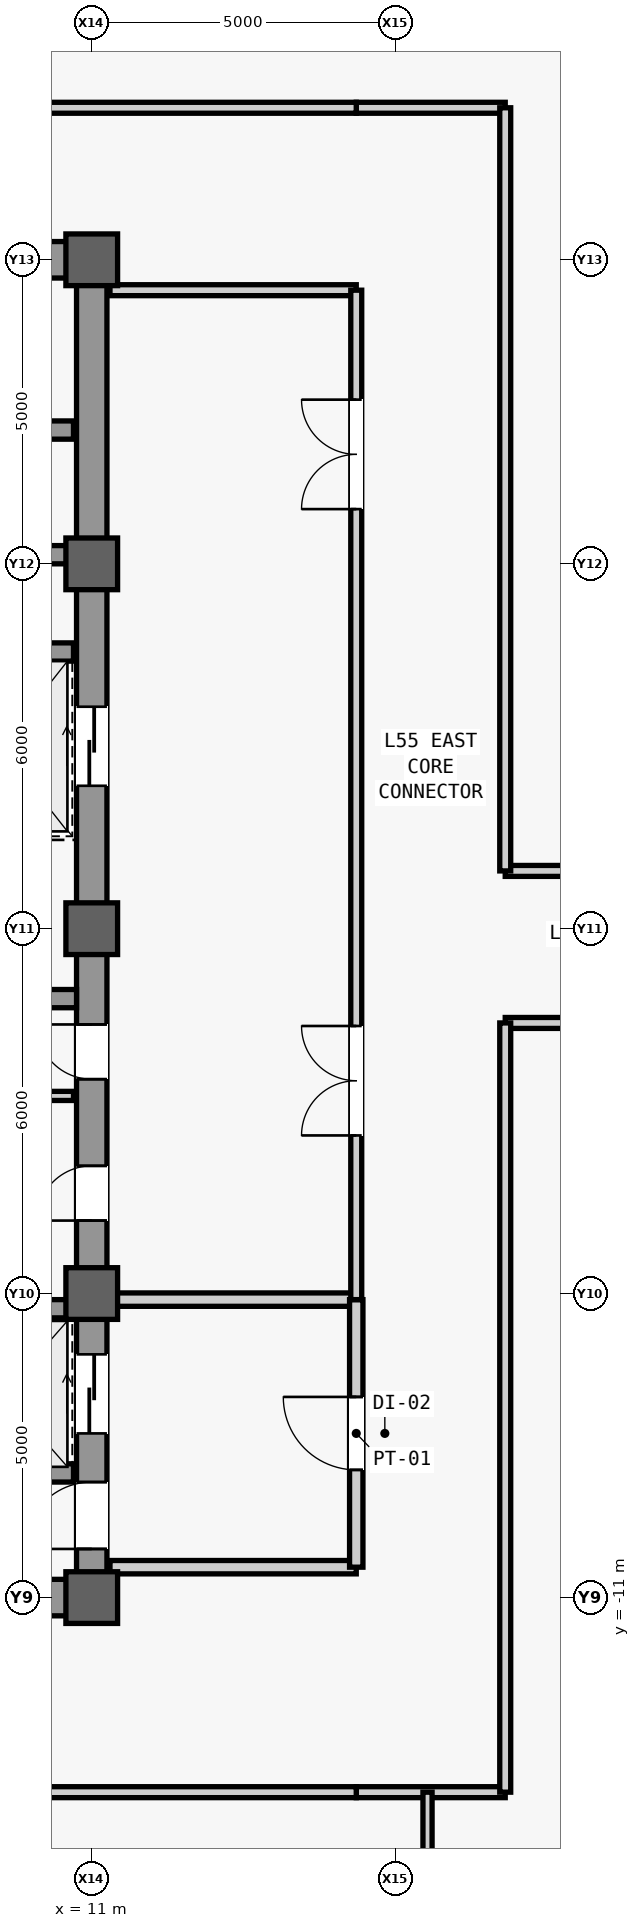
"""IFC4 building model, lengths in metres.
Left out: names, types, materials, properties, quantities, classifications, styles, units other than length and angle.
Written with IfcOpenShell. Run it as: python <this file> out.ifc"""

import sys

from ifc_helpers import new_model, si_unit, direction, frame, frame_2d, origin, origin_2d, place, context, subcontext, project, spatial, rectangle, extrude, source, transform, mapped, element, fill, save


model = new_model("IFC4")
c1 = context("Model", 3, precision=1e-05, world=origin(), true_north=direction((0.0, 1.0)))
c2 = subcontext(c1, "Body", "Model", "MODEL_VIEW")
j1 = project(units=[si_unit("LENGTHUNIT", "METRE"), si_unit("PLANEANGLEUNIT", "RADIAN")], contexts=[c1])
p1 = place(None, origin())
s1 = spatial("IfcSite", under=j1, at=p1, CompositionType="ELEMENT")
p2 = place(p1, origin())
s2 = spatial("IfcBuilding", under=s1, at=p2, CompositionType="ELEMENT")
p3 = place(p2, frame((0.0, 0.0, 235.1)))
s3 = spatial("IfcBuildingStorey", under=s2, at=p3, CompositionType="ELEMENT", Elevation=235.1)
m1 = source(origin(), c2, "Body", "SweptSolid", [
    extrude(rectangle(XDim=22.0, YDim=0.5, at=frame_2d((11.0, 0.0))), origin(), (0.0, 0.0, 1.0), 3.78),
])
p4 = place(p3, frame((11.0, -11.0, 0.0), z_axis=(0.0, 0.0, 1.0), x_axis=(0.0, 1.0, 0.0)))
e1 = element("IfcWall", 1, at=p4, inside=s3, PredefinedType="SHEAR", context=c2, shape_type="MappedRepresentation", body=[
    mapped(m1, transform((0.0, 0.0, 0.0), scale=1.0)),
])
m2 = source(origin(), c2, "Body", "SweptSolid", [
    extrude(rectangle(XDim=1.1, YDim=2.2, at=frame_2d((0.55, 1.1))), frame((0.0, 0.26, 0.0), z_axis=(0.0, -1.0, 0.0), x_axis=(1.0, 0.0, 0.0)), (0.0, 0.0, 1.0), 0.52),
])
p5 = place(p4, frame((0.8, 0.0, 0.0)))
e2 = element("IfcOpeningElement", 2, at=p5, cuts=e1, PredefinedType="OPENING", context=c2, shape_type="MappedRepresentation", body=[
    mapped(m2, transform((0.0, 0.0, 0.0), scale=1.0)),
])
m3 = source(origin(), c2, "Body", "SweptSolid", [
    extrude(rectangle(XDim=0.9, YDim=2.15, at=frame_2d((0.45, 1.075))), frame((0.0, 0.26, 0.0), z_axis=(0.0, -1.0, 0.0), x_axis=(1.0, 0.0, 0.0)), (0.0, 0.0, 1.0), 0.52),
])
p6 = place(p4, frame((6.2, 0.0, 0.0)))
e3 = element("IfcOpeningElement", 3, at=p6, cuts=e1, PredefinedType="OPENING", context=c2, shape_type="MappedRepresentation", body=[
    mapped(m3, transform((0.0, 0.0, 0.0), scale=1.0)),
])
p7 = place(p4, frame((8.525, 0.0, 0.0)))
e4 = element("IfcOpeningElement", 4, at=p7, cuts=e1, PredefinedType="OPENING", context=c2, shape_type="MappedRepresentation", body=[
    mapped(m3, transform((0.0, 0.0, 0.0), scale=1.0)),
])
m4 = source(origin(), c2, "Body", "SweptSolid", [
    extrude(rectangle(XDim=1.3, YDim=2.3, at=frame_2d((0.65, 1.15))), frame((0.0, 0.26, 0.0), z_axis=(0.0, -1.0, 0.0), x_axis=(1.0, 0.0, 0.0)), (0.0, 0.0, 1.0), 0.52),
])
p8 = place(p4, frame((2.7, 0.0, 0.0)))
e5 = element("IfcOpeningElement", 5, at=p8, cuts=e1, PredefinedType="OPENING", context=c2, shape_type="MappedRepresentation", body=[
    mapped(m4, transform((0.0, 0.0, 0.0), scale=1.0)),
])
p9 = place(p4, frame((13.35, 0.0, 0.0)))
e6 = element("IfcOpeningElement", 6, at=p9, cuts=e1, PredefinedType="OPENING", context=c2, shape_type="MappedRepresentation", body=[
    mapped(m4, transform((0.0, 0.0, 0.0), scale=1.0)),
])
m5 = source(origin(), c2, "Body", "SweptSolid", [
    extrude(rectangle(XDim=5.9, YDim=0.6, at=frame_2d((2.95, 0.0))), origin(), (0.0, 0.0, 1.0), 3.78),
])
p10 = place(p3, frame((4.85, -11.0, 0.0), z_axis=(0.0, 0.0, 1.0), x_axis=(1.0, 0.0, 0.0)))
e7 = element("IfcWall", 7, at=p10, inside=s3, PredefinedType="SHEAR", context=c2, shape_type="MappedRepresentation", body=[
    mapped(m5, transform((0.0, 0.0, 0.0), scale=1.0)),
])
p11 = place(p3, frame((4.85, 11.0, 0.0), z_axis=(0.0, 0.0, 1.0), x_axis=(1.0, 0.0, 0.0)))
e8 = element("IfcWall", 8, at=p11, inside=s3, PredefinedType="SHEAR", context=c2, shape_type="MappedRepresentation", body=[
    mapped(m5, transform((0.0, 0.0, 0.0), scale=1.0)),
])
m6 = source(origin(), c2, "Body", "SweptSolid", [
    extrude(rectangle(XDim=1.05, YDim=2.2, at=frame_2d((0.525, 1.1))), frame((0.0, 0.31, 0.0), z_axis=(0.0, -1.0, 0.0), x_axis=(1.0, 0.0, 0.0)), (0.0, 0.0, 1.0), 0.62),
])
p12 = place(p11, frame((1.375, 0.0, 0.0)))
e9 = element("IfcOpeningElement", 9, at=p12, cuts=e8, PredefinedType="OPENING", context=c2, shape_type="MappedRepresentation", body=[
    mapped(m6, transform((0.0, 0.0, 0.0), scale=1.0)),
])
m7 = source(origin(), c2, "Body", "SweptSolid", [
    extrude(rectangle(XDim=5.65, YDim=0.3, at=frame_2d((2.825, 0.0))), origin(), (0.0, 0.0, 1.0), 3.78),
])
p13 = place(p3, frame((5.1, -1.15, 0.0), z_axis=(0.0, 0.0, 1.0), x_axis=(1.0, 0.0, 0.0)))
e10 = element("IfcWall", 10, at=p13, inside=s3, PredefinedType="SHEAR", context=c2, shape_type="MappedRepresentation", body=[
    mapped(m7, transform((0.0, 0.0, 0.0), scale=1.0)),
])
m8 = source(origin(), c2, "Body", "SweptSolid", [
    extrude(rectangle(XDim=0.85, YDim=0.85, at=origin_2d()), origin(), (0.0, 0.0, 1.0), 4.0),
])
for number, where, z_axis, x_axis in (
    (11, (11.0, -11.0, 0.0), (0.0, 0.0, 1.0), (1.0, 0.0, 0.0)),
    (12, (11.0, -6.0, 0.0), (0.0, 0.0, 1.0), (1.0, 0.0, 0.0)),
    (13, (11.0, 0.0, 0.0), (0.0, 0.0, 1.0), (1.0, 0.0, 0.0)),
    (14, (11.0, 6.0, 0.0), (0.0, 0.0, 1.0), (1.0, 0.0, 0.0)),
    (15, (11.0, 11.0, 0.0), (0.0, 0.0, 1.0), (1.0, 0.0, 0.0)),
):
    element("IfcColumn", number, at=place(p3, frame(where, z_axis=z_axis, x_axis=x_axis)), inside=s3, PredefinedType="COLUMN", context=c2, shape_type="MappedRepresentation", body=[
        mapped(m8, transform((0.0, 0.0, 0.0), scale=1.0)),
    ])
m9 = source(origin(), c2, "Body", "SweptSolid", [
    extrude(rectangle(XDim=2.2, YDim=0.3, at=frame_2d((1.1, 0.0))), origin(), (0.0, 0.0, 1.0), 3.78),
])
for number, where, z_axis, x_axis in (
    (16, (8.5, -8.95, 0.0), (0.0, 0.0, 1.0), (1.0, 0.0, 0.0)),
    (17, (8.5, -6.25, 0.0), (0.0, 0.0, 1.0), (1.0, 0.0, 0.0)),
):
    element("IfcWall", number, at=place(p3, frame(where, z_axis=z_axis, x_axis=x_axis)), inside=s3, PredefinedType="SHEAR", context=c2, shape_type="MappedRepresentation", body=[
        mapped(m9, transform((0.0, 0.0, 0.0), scale=1.0)),
    ])
m10 = source(origin(), c2, "Body", "SweptSolid", [
    extrude(rectangle(XDim=2.3, YDim=0.3, at=frame_2d((1.15, 0.0))), origin(), (0.0, 0.0, 1.0), 3.78),
])
for number, where, z_axis, x_axis in (
    (18, (8.4, 4.55, 0.0), (0.0, 0.0, 1.0), (1.0, 0.0, 0.0)),
    (19, (8.4, 6.15, 0.0), (0.0, 0.0, 1.0), (1.0, 0.0, 0.0)),
    (20, (8.4, 8.2, 0.0), (0.0, 0.0, 1.0), (1.0, 0.0, 0.0)),
):
    element("IfcWall", number, at=place(p3, frame(where, z_axis=z_axis, x_axis=x_axis)), inside=s3, PredefinedType="SHEAR", context=c2, shape_type="MappedRepresentation", body=[
        mapped(m10, transform((0.0, 0.0, 0.0), scale=1.0)),
    ])
m11 = source(origin(), c2, "Body", "SweptSolid", [
    extrude(rectangle(XDim=2.05, YDim=0.15, at=frame_2d((1.025, 0.0))), origin(), (0.0, 0.0, 1.0), 3.78),
])
p14 = place(p3, frame((8.65, -2.75, 0.0), z_axis=(0.0, 0.0, 1.0), x_axis=(1.0, 0.0, 0.0)))
e21 = element("IfcWall", 21, at=p14, inside=s3, PredefinedType="PARTITIONING", context=c2, shape_type="MappedRepresentation", body=[
    mapped(m11, transform((0.0, 0.0, 0.0), scale=1.0)),
])
m12 = source(origin(), c2, "Body", "SweptSolid", [
    extrude(rectangle(XDim=4.05, YDim=0.22, at=frame_2d((2.025, 0.0))), origin(), (0.0, 0.0, 1.0), 3.78),
])
p15 = place(p3, frame((11.3, -10.5, 0.0), z_axis=(0.0, 0.0, 1.0), x_axis=(1.0, 0.0, 0.0)))
e22 = element("IfcWall", 22, at=p15, inside=s3, PredefinedType="PARTITIONING", context=c2, shape_type="MappedRepresentation", body=[
    mapped(m12, transform((0.0, 0.0, 0.0), scale=1.0)),
])
m13 = source(origin(), c2, "Body", "SweptSolid", [
    extrude(rectangle(XDim=4.05, YDim=0.22, at=frame_2d((2.025, 0.0))), origin(), (0.0, 0.0, 1.0), 3.085),
])
p16 = place(p3, frame((11.3, -6.1, 0.0), z_axis=(0.0, 0.0, 1.0), x_axis=(1.0, 0.0, 0.0)))
e23 = element("IfcWall", 23, at=p16, inside=s3, PredefinedType="PARTITIONING", context=c2, shape_type="MappedRepresentation", body=[
    mapped(m13, transform((0.0, 0.0, 0.0), scale=1.0)),
])
m14 = source(origin(), c2, "Body", "SweptSolid", [
    extrude(rectangle(XDim=4.4, YDim=0.22, at=frame_2d((2.2, 0.0))), origin(), (0.0, 0.0, 1.0), 3.78),
])
p17 = place(p3, frame((15.35, -10.5, 0.0), z_axis=(0.0, 0.0, 1.0), x_axis=(0.0, 1.0, 0.0)))
e24 = element("IfcWall", 24, at=p17, inside=s3, PredefinedType="PARTITIONING", context=c2, shape_type="MappedRepresentation", body=[
    mapped(m14, transform((0.0, 0.0, 0.0), scale=1.0)),
])
m15 = source(origin(), c2, "Body", "SweptSolid", [
    extrude(rectangle(XDim=1.2, YDim=2.2, at=frame_2d((0.6, 1.1))), frame((0.0, 0.12, 0.0), z_axis=(0.0, -1.0, 0.0), x_axis=(1.0, 0.0, 0.0)), (0.0, 0.0, 1.0), 0.24),
])
p18 = place(p17, frame((1.6, 0.0, 0.0)))
e25 = element("IfcOpeningElement", 25, at=p18, cuts=e24, PredefinedType="OPENING", context=c2, shape_type="MappedRepresentation", body=[
    mapped(m15, transform((0.0, 0.0, 0.0), scale=1.0)),
])
m16 = source(origin(), c2, "Body", "SweptSolid", [
    extrude(rectangle(XDim=4.05, YDim=0.18, at=frame_2d((2.025, 0.0))), origin(), (0.0, 0.0, 1.0), 3.78),
])
p19 = place(p3, frame((11.3, 10.5, 0.0), z_axis=(0.0, 0.0, 1.0), x_axis=(1.0, 0.0, 0.0)))
e26 = element("IfcWall", 26, at=p19, inside=s3, PredefinedType="PARTITIONING", context=c2, shape_type="MappedRepresentation", body=[
    mapped(m16, transform((0.0, 0.0, 0.0), scale=1.0)),
])
m17 = source(origin(), c2, "Body", "SweptSolid", [
    extrude(rectangle(XDim=16.6, YDim=0.18, at=frame_2d((8.3, 0.0))), origin(), (0.0, 0.0, 1.0), 3.78),
])
p20 = place(p3, frame((15.35, -6.1, 0.0), z_axis=(0.0, 0.0, 1.0), x_axis=(0.0, 1.0, 0.0)))
e27 = element("IfcWall", 27, at=p20, inside=s3, PredefinedType="PARTITIONING", context=c2, shape_type="MappedRepresentation", body=[
    mapped(m17, transform((0.0, 0.0, 0.0), scale=1.0)),
])
m18 = source(origin(), c2, "Body", "SweptSolid", [
    extrude(rectangle(XDim=1.8, YDim=2.25, at=frame_2d((0.9, 1.125))), frame((0.0, 0.1, 0.0), z_axis=(0.0, -1.0, 0.0), x_axis=(1.0, 0.0, 0.0)), (0.0, 0.0, 1.0), 0.2),
])
p21 = place(p20, frame((2.7, 0.0, 0.0)))
e28 = element("IfcOpeningElement", 28, at=p21, cuts=e27, PredefinedType="OPENING", context=c2, shape_type="MappedRepresentation", body=[
    mapped(m18, transform((0.0, 0.0, 0.0), scale=1.0)),
])
p22 = place(p20, frame((13.0, 0.0, 0.0)))
e29 = element("IfcOpeningElement", 29, at=p22, cuts=e27, PredefinedType="OPENING", context=c2, shape_type="MappedRepresentation", body=[
    mapped(m18, transform((0.0, 0.0, 0.0), scale=1.0)),
])
m19 = source(origin(), c2, "Body", "SweptSolid", [
    extrude(rectangle(XDim=2.45, YDim=0.18, at=frame_2d((1.225, 0.0))), origin(), (0.0, 0.0, 1.0), 3.78),
])
for number, where, z_axis, x_axis in (
    (30, (15.35, -14.2, 0.0), (0.0, 0.0, 1.0), (1.0, 0.0, 0.0)),
    (31, (15.35, 13.5, 0.0), (0.0, 0.0, 1.0), (1.0, 0.0, 0.0)),
):
    element("IfcWall", number, at=place(p3, frame(where, z_axis=z_axis, x_axis=x_axis)), inside=s3, PredefinedType="PARTITIONING", context=c2, shape_type="MappedRepresentation", body=[
        mapped(m19, transform((0.0, 0.0, 0.0), scale=1.0)),
    ])
m20 = source(origin(), c2, "Body", "SweptSolid", [
    extrude(rectangle(XDim=15.8, YDim=0.15, at=frame_2d((7.9, 0.0))), origin(), (0.0, 0.0, 1.0), 3.78),
])
p23 = place(p3, frame((16.522, -30.0, 0.0), z_axis=(0.0, 0.0, 1.0), x_axis=(0.0, 1.0, 0.0)))
e32 = element("IfcWall", 32, at=p23, inside=s3, PredefinedType="PARTITIONING", context=c2, shape_type="MappedRepresentation", body=[
    mapped(m20, transform((0.0, 0.0, 0.0), scale=1.0)),
])
m21 = source(origin(), c2, "Body", "SweptSolid", [
    extrude(rectangle(XDim=0.95, YDim=2.15, at=frame_2d((0.475, 1.075))), frame((0.0, 0.085, 0.0), z_axis=(0.0, -1.0, 0.0), x_axis=(1.0, 0.0, 0.0)), (0.0, 0.0, 1.0), 0.17),
])
p24 = place(p23, frame((11.375, 0.0, 0.0)))
e33 = element("IfcOpeningElement", 33, at=p24, cuts=e32, PredefinedType="OPENING", context=c2, shape_type="MappedRepresentation", body=[
    mapped(m21, transform((0.0, 0.0, 0.0), scale=1.0)),
])
m22 = source(origin(), c2, "Body", "SweptSolid", [
    extrude(rectangle(XDim=6.05, YDim=0.18, at=frame_2d((3.025, 0.0))), origin(), (0.0, 0.0, 1.0), 3.78),
])
p25 = place(p3, frame((9.3, -14.2, 0.0), z_axis=(0.0, 0.0, 1.0), x_axis=(1.0, 0.0, 0.0)))
e34 = element("IfcWall", 34, at=p25, inside=s3, PredefinedType="PARTITIONING", context=c2, shape_type="MappedRepresentation", body=[
    mapped(m22, transform((0.0, 0.0, 0.0), scale=1.0)),
])
m23 = source(origin(), c2, "Body", "SweptSolid", [
    extrude(rectangle(XDim=18.65, YDim=0.18, at=frame_2d((9.325, 0.0))), origin(), (0.0, 0.0, 1.0), 3.78),
])
p26 = place(p3, frame((-3.3, 13.5, 0.0), z_axis=(0.0, 0.0, 1.0), x_axis=(1.0, 0.0, 0.0)))
e35 = element("IfcWall", 35, at=p26, inside=s3, PredefinedType="PARTITIONING", context=c2, shape_type="MappedRepresentation", body=[
    mapped(m23, transform((0.0, 0.0, 0.0), scale=1.0)),
])
m24 = source(origin(), c2, "Body", "SweptSolid", [
    extrude(rectangle(XDim=12.2, YDim=0.18, at=frame_2d((6.1, 0.0))), origin(), (0.0, 0.0, 1.0), 3.78),
])
p27 = place(p3, frame((17.8, -1.55, 0.0), z_axis=(0.0, 0.0, 1.0), x_axis=(1.0, 0.0, 0.0)))
e36 = element("IfcWall", 36, at=p27, inside=s3, PredefinedType="PARTITIONING", context=c2, shape_type="MappedRepresentation", body=[
    mapped(m24, transform((0.0, 0.0, 0.0), scale=1.0)),
])
m25 = source(origin(), c2, "Body", "SweptSolid", [
    extrude(rectangle(XDim=0.95, YDim=2.15, at=frame_2d((0.475, 1.075))), frame((0.0, 0.1, 0.0), z_axis=(0.0, -1.0, 0.0), x_axis=(1.0, 0.0, 0.0)), (0.0, 0.0, 1.0), 0.2),
])
p28 = place(p27, frame((5.625, 0.0, 0.0)))
e37 = element("IfcOpeningElement", 37, at=p28, cuts=e36, PredefinedType="OPENING", context=c2, shape_type="MappedRepresentation", body=[
    mapped(m25, transform((0.0, 0.0, 0.0), scale=1.0)),
])
m26 = source(origin(), c2, "Body", "SweptSolid", [
    extrude(rectangle(XDim=12.65, YDim=0.18, at=frame_2d((6.325, 0.0))), origin(), (0.0, 0.0, 1.0), 3.78),
])
p29 = place(p3, frame((17.8, -14.2, 0.0), z_axis=(0.0, 0.0, 1.0), x_axis=(0.0, 1.0, 0.0)))
e38 = element("IfcWall", 38, at=p29, inside=s3, PredefinedType="PARTITIONING", context=c2, shape_type="MappedRepresentation", body=[
    mapped(m26, transform((0.0, 0.0, 0.0), scale=1.0)),
])
p30 = place(p3, frame((17.8, 0.95, 0.0), z_axis=(0.0, 0.0, 1.0), x_axis=(1.0, 0.0, 0.0)))
e39 = element("IfcWall", 39, at=p30, inside=s3, PredefinedType="PARTITIONING", context=c2, shape_type="MappedRepresentation", body=[
    mapped(m24, transform((0.0, 0.0, 0.0), scale=1.0)),
])
p31 = place(p30, frame((5.625, 0.0, 0.0)))
e40 = element("IfcOpeningElement", 40, at=p31, cuts=e39, PredefinedType="OPENING", context=c2, shape_type="MappedRepresentation", body=[
    mapped(m25, transform((0.0, 0.0, 0.0), scale=1.0)),
])
m27 = source(origin(), c2, "Body", "SweptSolid", [
    extrude(rectangle(XDim=12.55, YDim=0.18, at=frame_2d((6.275, 0.0))), origin(), (0.0, 0.0, 1.0), 3.78),
])
p32 = place(p3, frame((17.8, 0.95, 0.0), z_axis=(0.0, 0.0, 1.0), x_axis=(0.0, 1.0, 0.0)))
e41 = element("IfcWall", 41, at=p32, inside=s3, PredefinedType="PARTITIONING", context=c2, shape_type="MappedRepresentation", body=[
    mapped(m27, transform((0.0, 0.0, 0.0), scale=1.0)),
])
m28 = source(origin(), c2, "Body", "SweptSolid", [
    extrude(rectangle(XDim=1.1, YDim=2.2, at=frame_2d((0.55, 1.1))), frame((0.0, 0.025, 0.0), z_axis=(0.0, -1.0, 0.0), x_axis=(1.0, 0.0, 0.0)), (0.0, 0.0, 1.0), 0.05),
])
p33 = place(p5, origin())
e42 = element("IfcDoor", 42, at=p33, inside=s3, OperationType="SINGLE_SWING_LEFT", PredefinedType="DOOR", context=c2, shape_type="MappedRepresentation", body=[
    mapped(m28, transform((0.0, 0.0, 0.0), scale=1.0)),
])
fill(e2, e42)
m29 = source(origin(), c2, "Body", "SweptSolid", [
    extrude(rectangle(XDim=0.9, YDim=2.15, at=frame_2d((0.45, 1.075))), frame((0.0, 0.025, 0.0), z_axis=(0.0, -1.0, 0.0), x_axis=(1.0, 0.0, 0.0)), (0.0, 0.0, 1.0), 0.05),
])
p34 = place(p6, origin())
e43 = element("IfcDoor", 43, at=p34, inside=s3, OperationType="SINGLE_SWING_LEFT", PredefinedType="DOOR", context=c2, shape_type="MappedRepresentation", body=[
    mapped(m29, transform((0.0, 0.0, 0.0), scale=1.0)),
])
fill(e3, e43)
p35 = place(p7, origin())
e44 = element("IfcDoor", 44, at=p35, inside=s3, OperationType="SINGLE_SWING_RIGHT", PredefinedType="DOOR", context=c2, shape_type="MappedRepresentation", body=[
    mapped(m29, transform((0.0, 0.0, 0.0), scale=1.0)),
])
fill(e4, e44)
m30 = source(origin(), c2, "Body", "SweptSolid", [
    extrude(rectangle(XDim=1.2, YDim=2.2, at=frame_2d((0.6, 1.1))), frame((0.0, 0.025, 0.0), z_axis=(0.0, -1.0, 0.0), x_axis=(1.0, 0.0, 0.0)), (0.0, 0.0, 1.0), 0.05),
])
p36 = place(p18, origin())
e45 = element("IfcDoor", 45, at=p36, inside=s3, OperationType="SINGLE_SWING_RIGHT", PredefinedType="DOOR", context=c2, shape_type="MappedRepresentation", body=[
    mapped(m30, transform((0.0, 0.0, 0.0), scale=1.0)),
])
fill(e25, e45)
m31 = source(origin(), c2, "Body", "SweptSolid", [
    extrude(rectangle(XDim=1.8, YDim=2.25, at=frame_2d((0.9, 1.125))), frame((0.0, 0.025, 0.0), z_axis=(0.0, -1.0, 0.0), x_axis=(1.0, 0.0, 0.0)), (0.0, 0.0, 1.0), 0.05),
])
p37 = place(p21, origin())
e46 = element("IfcDoor", 46, at=p37, inside=s3, OperationType="SINGLE_SWING_RIGHT", PredefinedType="DOOR", context=c2, shape_type="MappedRepresentation", body=[
    mapped(m31, transform((0.0, 0.0, 0.0), scale=1.0)),
])
fill(e28, e46)
p38 = place(p22, origin())
e47 = element("IfcDoor", 47, at=p38, inside=s3, OperationType="SINGLE_SWING_LEFT", PredefinedType="DOOR", context=c2, shape_type="MappedRepresentation", body=[
    mapped(m31, transform((0.0, 0.0, 0.0), scale=1.0)),
])
fill(e29, e47)
m32 = source(origin(), c2, "Body", "SweptSolid", [
    extrude(rectangle(XDim=1.3, YDim=2.3, at=frame_2d((0.65, 1.15))), frame((0.0, 0.025, 0.0), z_axis=(0.0, -1.0, 0.0), x_axis=(1.0, 0.0, 0.0)), (0.0, 0.0, 1.0), 0.05),
])
p39 = place(p8, origin())
e48 = element("IfcDoor", 48, at=p39, inside=s3, OperationType="SLIDING_TO_LEFT", PredefinedType="DOOR", context=c2, shape_type="MappedRepresentation", body=[
    mapped(m32, transform((0.0, 0.0, 0.0), scale=1.0)),
])
fill(e5, e48)
p40 = place(p9, origin())
e49 = element("IfcDoor", 49, at=p40, inside=s3, OperationType="SLIDING_TO_LEFT", PredefinedType="DOOR", context=c2, shape_type="MappedRepresentation", body=[
    mapped(m32, transform((0.0, 0.0, 0.0), scale=1.0)),
])
fill(e6, e49)
save(model, sys.argv[1])
